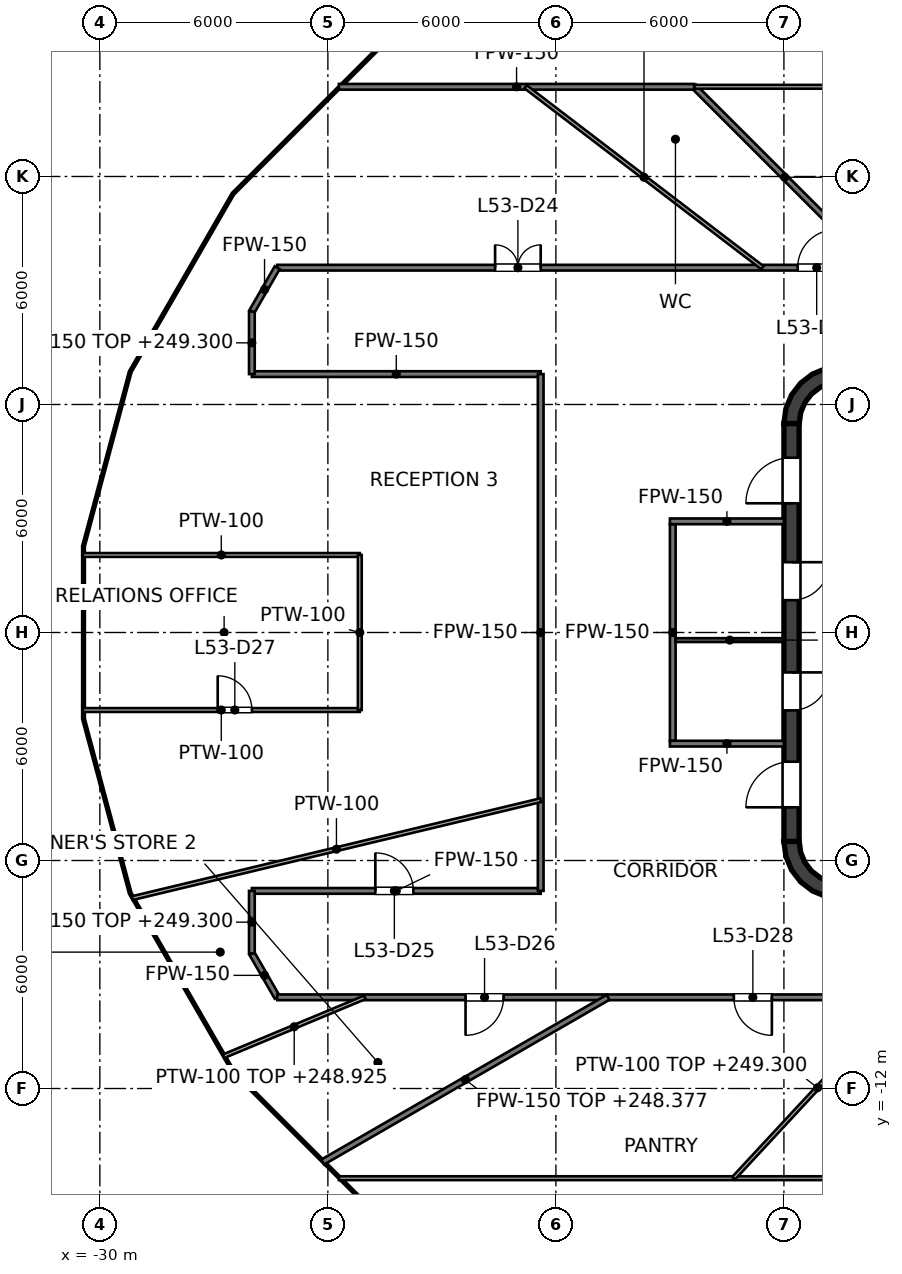
"""IFC4 building model, lengths in metres.
Left out: names, types, materials, properties, quantities, classifications, styles, units other than length and angle.
Written with IfcOpenShell. Run it as: python <this file> out.ifc"""

import sys

from ifc_helpers import new_model, si_unit, direction, frame, frame_2d, origin, place, context, subcontext, project, spatial, polyline, rectangle, outline, extrude, element, fill, save


model = new_model("IFC4")
c1 = context("Model", 3, precision=1e-05, world=origin(), true_north=direction((0.0, 1.0)))
c2 = subcontext(c1, "Body", "Model", "MODEL_VIEW")
j1 = project(units=[si_unit("LENGTHUNIT", "METRE"), si_unit("PLANEANGLEUNIT", "RADIAN")], contexts=[c1])
p1 = place(None, origin())
s1 = spatial("IfcSite", under=j1, at=p1, CompositionType="ELEMENT")
p2 = place(p1, origin())
s2 = spatial("IfcBuilding", under=s1, at=p2, CompositionType="ELEMENT")
p3 = place(p2, frame((0.0, 0.0, 245.6)))
s3 = spatial("IfcBuildingStorey", under=s2, at=p3, CompositionType="ELEMENT", Elevation=245.6)
p4 = place(p3, frame((-11.8, -5.5, 0.0), z_axis=(0.0, 0.0, 1.0), x_axis=(0.0, 1.0, 0.0)))
e1 = element("IfcWall", 1, at=p4, inside=s3, PredefinedType="SHEAR", context=c2, shape_type="SweptSolid", body=[
    extrude(rectangle(XDim=11.0, YDim=0.4, at=frame_2d((5.5, 0.0))), origin(), (0.0, 0.0, 1.0), 4.0),
])
p5 = place(p4, frame((3.45, 0.0, 0.0)))
e2 = element("IfcOpeningElement", 2, at=p5, cuts=e1, PredefinedType="OPENING", context=c2, shape_type="SweptSolid", body=[
    extrude(rectangle(XDim=1.0, YDim=2.1, at=frame_2d((0.5, 1.05))), frame((0.0, 0.2, 0.0), z_axis=(0.0, -1.0, 0.0), x_axis=(1.0, 0.0, 0.0)), (0.0, 0.0, 1.0), 0.4),
])
p6 = place(p4, frame((6.35, 0.0, 0.0)))
e3 = element("IfcOpeningElement", 3, at=p6, cuts=e1, PredefinedType="OPENING", context=c2, shape_type="SweptSolid", body=[
    extrude(rectangle(XDim=1.0, YDim=2.1, at=frame_2d((0.5, 1.05))), frame((0.0, 0.2, 0.0), z_axis=(0.0, -1.0, 0.0), x_axis=(1.0, 0.0, 0.0)), (0.0, 0.0, 1.0), 0.4),
])
p7 = place(p4, frame((0.9, 0.0, 0.0)))
e4 = element("IfcOpeningElement", 4, at=p7, cuts=e1, PredefinedType="OPENING", context=c2, shape_type="SweptSolid", body=[
    extrude(rectangle(XDim=1.2, YDim=2.1, at=frame_2d((0.6, 1.05))), frame((0.0, 0.2, 0.0), z_axis=(0.0, -1.0, 0.0), x_axis=(1.0, 0.0, 0.0)), (0.0, 0.0, 1.0), 0.4),
])
p8 = place(p4, frame((8.9, 0.0, 0.0)))
e5 = element("IfcOpeningElement", 5, at=p8, cuts=e1, PredefinedType="OPENING", context=c2, shape_type="SweptSolid", body=[
    extrude(rectangle(XDim=1.2, YDim=2.1, at=frame_2d((0.6, 1.05))), frame((0.0, 0.2, 0.0), z_axis=(0.0, -1.0, 0.0), x_axis=(1.0, 0.0, 0.0)), (0.0, 0.0, 1.0), 0.4),
])
p9 = place(p3, origin())
e6 = element("IfcWall", 6, at=p9, inside=s3, PredefinedType="SHEAR", context=c2, shape_type="SweptSolid", body=[
    extrude(outline(polyline([(-12.0, 5.5), (-11.596, 5.5), (-11.559, 5.784), (-11.45, 6.048), (-11.275, 6.275), (-11.048, 6.45), (-10.784, 6.559), (-10.5, 6.596), (-10.5, 7.0), (-10.888, 6.949), (-11.25, 6.799), (-11.561, 6.561), (-11.799, 6.25), (-11.949, 5.888), (-12.0, 5.5)])), origin(), (0.0, 0.0, 1.0), 4.0),
])
e7 = element("IfcWall", 7, at=p9, inside=s3, PredefinedType="SHEAR", context=c2, shape_type="SweptSolid", body=[
    extrude(outline(polyline([(-10.5, -7.0), (-10.5, -6.596), (-10.784, -6.559), (-11.048, -6.45), (-11.275, -6.275), (-11.45, -6.048), (-11.559, -5.784), (-11.596, -5.5), (-12.0, -5.5), (-11.949, -5.888), (-11.799, -6.25), (-11.561, -6.561), (-11.25, -6.799), (-10.888, -6.949), (-10.5, -7.0)])), origin(), (0.0, 0.0, 1.0), 4.0),
])
p10 = place(p3, frame((-14.925, -2.85, 0.0), z_axis=(0.0, 0.0, 1.0), x_axis=(0.0, 1.0, 0.0)))
e8 = element("IfcWall", 8, at=p10, inside=s3, PredefinedType="PARTITIONING", context=c2, shape_type="SweptSolid", body=[
    extrude(rectangle(XDim=5.7, YDim=0.15, at=frame_2d((2.85, 0.0))), origin(), (0.0, 0.0, 1.0), 2.768),
])
for number, where, z_axis, x_axis in (
    (9, (-15.0, 2.925, 0.0), (0.0, 0.0, 1.0), (1.0, 0.0, 0.0)),
    (10, (-15.0, -2.925, 0.0), (0.0, 0.0, 1.0), (1.0, 0.0, 0.0)),
):
    element("IfcWall", number, at=place(p3, frame(where, z_axis=z_axis, x_axis=x_axis)), inside=s3, PredefinedType="PARTITIONING", context=c2, shape_type="SweptSolid", body=[
        extrude(rectangle(XDim=3.0, YDim=0.15, at=frame_2d((1.5, 0.0))), origin(), (0.0, 0.0, 1.0), 2.768),
    ])
p11 = place(p3, frame((-14.85, -0.2, 0.0), z_axis=(0.0, 0.0, 1.0), x_axis=(1.0, 0.0, 0.0)))
e11 = element("IfcWall", 11, at=p11, inside=s3, PredefinedType="PARTITIONING", context=c2, shape_type="SweptSolid", body=[
    extrude(rectangle(XDim=2.85, YDim=0.1, at=frame_2d((1.425, 0.0))), origin(), (0.0, 0.0, 1.0), 2.768),
])
p12 = place(p3, frame((-26.0, -8.445, 0.0), z_axis=(0.0, 0.0, 1.0), x_axis=(0.500076310463, -0.865981341435, 0.0)))
e12 = element("IfcWall", 12, at=p12, inside=s3, PredefinedType="PARTITIONING", context=c2, shape_type="SweptSolid", body=[
    extrude(rectangle(XDim=1.334, YDim=0.15, at=frame_2d((0.667, 0.0))), origin(), (0.0, 0.0, 1.0), 2.768),
])
p13 = place(p3, frame((-14.36, 14.36, 0.0), z_axis=(0.0, 0.0, 1.0), x_axis=(0.707106781187, -0.707106781187, 0.0)))
e13 = element("IfcWall", 13, at=p13, inside=s3, PredefinedType="PARTITIONING", context=c2, shape_type="SweptSolid", body=[
    extrude(rectangle(XDim=6.732, YDim=0.15, at=frame_2d((3.366, 0.0))), origin(), (0.0, 0.0, 1.0), 2.768),
])
p14 = place(p3, frame((-25.333, -9.6, 0.0), z_axis=(0.0, 0.0, 1.0), x_axis=(1.0, 0.0, 0.0)))
e14 = element("IfcWall", 14, at=p14, inside=s3, PredefinedType="PARTITIONING", context=c2, shape_type="SweptSolid", body=[
    extrude(rectangle(XDim=50.666, YDim=0.15, at=frame_2d((25.333, 0.0))), origin(), (0.0, 0.0, 1.0), 2.768),
])
p15 = place(p14, frame((4.956, 0.0, 0.0)))
e15 = element("IfcOpeningElement", 15, at=p15, cuts=e14, PredefinedType="OPENING", context=c2, shape_type="SweptSolid", body=[
    extrude(rectangle(XDim=1.0, YDim=2.1, at=frame_2d((0.5, 1.05))), frame((0.0, 0.075, 0.0), z_axis=(0.0, -1.0, 0.0), x_axis=(1.0, 0.0, 0.0)), (0.0, 0.0, 1.0), 0.15),
])
p16 = place(p14, frame((12.016, 0.0, 0.0)))
e16 = element("IfcOpeningElement", 16, at=p16, cuts=e14, PredefinedType="OPENING", context=c2, shape_type="SweptSolid", body=[
    extrude(rectangle(XDim=1.0, YDim=2.1, at=frame_2d((0.5, 1.05))), frame((0.0, 0.075, 0.0), z_axis=(0.0, -1.0, 0.0), x_axis=(1.0, 0.0, 0.0)), (0.0, 0.0, 1.0), 0.15),
])
p17 = place(p14, frame((18.068, 0.0, 0.0)))
e17 = element("IfcOpeningElement", 17, at=p17, cuts=e14, PredefinedType="OPENING", context=c2, shape_type="SweptSolid", body=[
    extrude(rectangle(XDim=1.0, YDim=2.1, at=frame_2d((0.5, 1.05))), frame((0.0, 0.075, 0.0), z_axis=(0.0, -1.0, 0.0), x_axis=(1.0, 0.0, 0.0)), (0.0, 0.0, 1.0), 0.15),
])
p18 = place(p14, frame((22.521, 0.0, 0.0)))
e18 = element("IfcOpeningElement", 18, at=p18, cuts=e14, PredefinedType="OPENING", context=c2, shape_type="SweptSolid", body=[
    extrude(rectangle(XDim=1.0, YDim=2.1, at=frame_2d((0.5, 1.05))), frame((0.0, 0.075, 0.0), z_axis=(0.0, -1.0, 0.0), x_axis=(1.0, 0.0, 0.0)), (0.0, 0.0, 1.0), 0.15),
])
p19 = place(p14, frame((26.665, 0.0, 0.0)))
e19 = element("IfcOpeningElement", 19, at=p19, cuts=e14, PredefinedType="OPENING", context=c2, shape_type="SweptSolid", body=[
    extrude(rectangle(XDim=1.0, YDim=2.1, at=frame_2d((0.5, 1.05))), frame((0.0, 0.075, 0.0), z_axis=(0.0, -1.0, 0.0), x_axis=(1.0, 0.0, 0.0)), (0.0, 0.0, 1.0), 0.15),
])
p20 = place(p14, frame((31.12, 0.0, 0.0)))
e20 = element("IfcOpeningElement", 20, at=p20, cuts=e14, PredefinedType="OPENING", context=c2, shape_type="SweptSolid", body=[
    extrude(rectangle(XDim=1.0, YDim=2.1, at=frame_2d((0.5, 1.05))), frame((0.0, 0.075, 0.0), z_axis=(0.0, -1.0, 0.0), x_axis=(1.0, 0.0, 0.0)), (0.0, 0.0, 1.0), 0.15),
])
p21 = place(p14, frame((41.953, 0.0, 0.0)))
e21 = element("IfcOpeningElement", 21, at=p21, cuts=e14, PredefinedType="OPENING", context=c2, shape_type="SweptSolid", body=[
    extrude(rectangle(XDim=1.0, YDim=2.1, at=frame_2d((0.5, 1.05))), frame((0.0, 0.075, 0.0), z_axis=(0.0, -1.0, 0.0), x_axis=(1.0, 0.0, 0.0)), (0.0, 0.0, 1.0), 0.15),
])
p22 = place(p3, frame((-26.0, -6.8, 0.0), z_axis=(0.0, 0.0, 1.0), x_axis=(1.0, 0.0, 0.0)))
e22 = element("IfcWall", 22, at=p22, inside=s3, PredefinedType="PARTITIONING", context=c2, shape_type="SweptSolid", body=[
    extrude(rectangle(XDim=7.6, YDim=0.15, at=frame_2d((3.8, 0.0))), origin(), (0.0, 0.0, 1.0), 2.768),
])
p23 = place(p22, frame((3.249, 0.0, 0.0)))
e23 = element("IfcOpeningElement", 23, at=p23, cuts=e22, PredefinedType="OPENING", context=c2, shape_type="SweptSolid", body=[
    extrude(rectangle(XDim=1.0, YDim=2.1, at=frame_2d((0.5, 1.05))), frame((0.0, 0.075, 0.0), z_axis=(0.0, -1.0, 0.0), x_axis=(1.0, 0.0, 0.0)), (0.0, 0.0, 1.0), 0.15),
])
p24 = place(p3, frame((-26.0, 6.8, 0.0), z_axis=(0.0, 0.0, 1.0), x_axis=(1.0, 0.0, 0.0)))
e24 = element("IfcWall", 24, at=p24, inside=s3, PredefinedType="PARTITIONING", context=c2, shape_type="SweptSolid", body=[
    extrude(rectangle(XDim=7.6, YDim=0.15, at=frame_2d((3.8, 0.0))), origin(), (0.0, 0.0, 1.0), 2.768),
])
p25 = place(p3, frame((-25.333, 9.6, 0.0), z_axis=(0.0, 0.0, 1.0), x_axis=(1.0, 0.0, 0.0)))
e25 = element("IfcWall", 25, at=p25, inside=s3, PredefinedType="PARTITIONING", context=c2, shape_type="SweptSolid", body=[
    extrude(rectangle(XDim=50.666, YDim=0.15, at=frame_2d((25.333, 0.0))), origin(), (0.0, 0.0, 1.0), 2.768),
])
p26 = place(p25, frame((40.221, 0.0, 0.0)))
e26 = element("IfcOpeningElement", 26, at=p26, cuts=e25, PredefinedType="OPENING", context=c2, shape_type="SweptSolid", body=[
    extrude(rectangle(XDim=1.2, YDim=2.1, at=frame_2d((0.6, 1.05))), frame((0.0, 0.075, 0.0), z_axis=(0.0, -1.0, 0.0), x_axis=(1.0, 0.0, 0.0)), (0.0, 0.0, 1.0), 0.15),
])
p27 = place(p25, frame((28.328, 0.0, 0.0)))
e27 = element("IfcOpeningElement", 27, at=p27, cuts=e25, PredefinedType="OPENING", context=c2, shape_type="SweptSolid", body=[
    extrude(rectangle(XDim=1.0, YDim=2.1, at=frame_2d((0.5, 1.05))), frame((0.0, 0.075, 0.0), z_axis=(0.0, -1.0, 0.0), x_axis=(1.0, 0.0, 0.0)), (0.0, 0.0, 1.0), 0.15),
])
p28 = place(p25, frame((24.461, 0.0, 0.0)))
e28 = element("IfcOpeningElement", 28, at=p28, cuts=e25, PredefinedType="OPENING", context=c2, shape_type="SweptSolid", body=[
    extrude(rectangle(XDim=1.0, YDim=2.1, at=frame_2d((0.5, 1.05))), frame((0.0, 0.075, 0.0), z_axis=(0.0, -1.0, 0.0), x_axis=(1.0, 0.0, 0.0)), (0.0, 0.0, 1.0), 0.15),
])
p29 = place(p25, frame((18.938, 0.0, 0.0)))
e29 = element("IfcOpeningElement", 29, at=p29, cuts=e25, PredefinedType="OPENING", context=c2, shape_type="SweptSolid", body=[
    extrude(rectangle(XDim=1.0, YDim=2.1, at=frame_2d((0.5, 1.05))), frame((0.0, 0.075, 0.0), z_axis=(0.0, -1.0, 0.0), x_axis=(1.0, 0.0, 0.0)), (0.0, 0.0, 1.0), 0.15),
])
p30 = place(p25, frame((13.695, 0.0, 0.0)))
e30 = element("IfcOpeningElement", 30, at=p30, cuts=e25, PredefinedType="OPENING", context=c2, shape_type="SweptSolid", body=[
    extrude(rectangle(XDim=1.0, YDim=2.1, at=frame_2d((0.5, 1.05))), frame((0.0, 0.075, 0.0), z_axis=(0.0, -1.0, 0.0), x_axis=(1.0, 0.0, 0.0)), (0.0, 0.0, 1.0), 0.15),
])
p31 = place(p25, frame((5.733, 0.0, 0.0)))
e31 = element("IfcOpeningElement", 31, at=p31, cuts=e25, PredefinedType="OPENING", context=c2, shape_type="SweptSolid", body=[
    extrude(rectangle(XDim=1.2, YDim=2.1, at=frame_2d((0.6, 1.05))), frame((0.0, 0.075, 0.0), z_axis=(0.0, -1.0, 0.0), x_axis=(1.0, 0.0, 0.0)), (0.0, 0.0, 1.0), 0.15),
])
p32 = place(p3, frame((-23.71, 14.36, 0.0), z_axis=(0.0, 0.0, 1.0), x_axis=(1.0, 0.0, 0.0)))
e32 = element("IfcWall", 32, at=p32, inside=s3, PredefinedType="PARTITIONING", context=c2, shape_type="SweptSolid", body=[
    extrude(rectangle(XDim=9.35, YDim=0.15, at=frame_2d((4.675, 0.0))), origin(), (0.0, 0.0, 1.0), 2.768),
])
p33 = place(p3, frame((-24.135, -13.935, 0.0), z_axis=(0.0, 0.0, 1.0), x_axis=(0.866016292776, 0.500015780397, 0.0)))
e33 = element("IfcWall", 33, at=p33, inside=s3, PredefinedType="PARTITIONING", context=c2, shape_type="SweptSolid", body=[
    extrude(rectangle(XDim=8.67, YDim=0.15, at=frame_2d((4.335, 0.0))), origin(), (0.0, 0.0, 1.0), 2.777),
])
p34 = place(p3, frame((-26.0, 8.445, 0.0), z_axis=(0.0, 0.0, 1.0), x_axis=(0.500076310463, 0.865981341435, 0.0)))
e34 = element("IfcWall", 34, at=p34, inside=s3, PredefinedType="PARTITIONING", context=c2, shape_type="SweptSolid", body=[
    extrude(rectangle(XDim=1.334, YDim=0.15, at=frame_2d((0.667, 0.0))), origin(), (0.0, 0.0, 1.0), 2.768),
])
p35 = place(p3, frame((-18.4, -6.8, 0.0), z_axis=(0.0, 0.0, 1.0), x_axis=(0.0, 1.0, 0.0)))
e35 = element("IfcWall", 35, at=p35, inside=s3, PredefinedType="PARTITIONING", context=c2, shape_type="SweptSolid", body=[
    extrude(rectangle(XDim=13.6, YDim=0.15, at=frame_2d((6.8, 0.0))), origin(), (0.0, 0.0, 1.0), 2.768),
])
for number, where, z_axis, x_axis in (
    (36, (-26.0, -8.445, 0.0), (0.0, 0.0, 1.0), (0.0, 1.0, 0.0)),
    (37, (-26.0, 6.8, 0.0), (0.0, 0.0, 1.0), (0.0, 1.0, 0.0)),
):
    element("IfcWall", number, at=place(p3, frame(where, z_axis=z_axis, x_axis=x_axis)), inside=s3, PredefinedType="PARTITIONING", context=c2, shape_type="SweptSolid", body=[
        extrude(rectangle(XDim=1.645, YDim=0.15, at=frame_2d((0.823, 0.0))), origin(), (0.0, 0.0, 1.0), 3.7),
    ])
p36 = place(p3, frame((-18.797, 14.36, 0.0), z_axis=(0.0, 0.0, 1.0), x_axis=(0.794667043869, -0.607045541445, 0.0)))
e38 = element("IfcWall", 38, at=p36, inside=s3, PredefinedType="PARTITIONING", context=c2, shape_type="SweptSolid", body=[
    extrude(rectangle(XDim=7.841, YDim=0.1, at=frame_2d((3.921, 0.0))), origin(), (0.0, 0.0, 1.0), 3.7),
])
p37 = place(p3, frame((-23.71, -14.36, 0.0), z_axis=(0.0, 0.0, 1.0), x_axis=(1.0, 0.0, 0.0)))
e39 = element("IfcWall", 39, at=p37, inside=s3, PredefinedType="PARTITIONING", context=c2, shape_type="SweptSolid", body=[
    extrude(rectangle(XDim=47.42, YDim=0.1, at=frame_2d((23.71, 0.0))), origin(), (0.0, 0.0, 1.0), 2.768),
])
p38 = place(p37, frame((19.302, 0.0, 0.0)))
e40 = element("IfcOpeningElement", 40, at=p38, cuts=e39, PredefinedType="OPENING", context=c2, shape_type="SweptSolid", body=[
    extrude(rectangle(XDim=1.8, YDim=2.1, at=frame_2d((0.9, 1.05))), frame((0.0, 0.05, 0.0), z_axis=(0.0, -1.0, 0.0), x_axis=(1.0, 0.0, 0.0)), (0.0, 0.0, 1.0), 0.1),
])
p39 = place(p37, frame((41.074, 0.0, 0.0)))
e41 = element("IfcOpeningElement", 41, at=p39, cuts=e39, PredefinedType="OPENING", context=c2, shape_type="SweptSolid", body=[
    extrude(rectangle(XDim=1.8, YDim=2.1, at=frame_2d((0.9, 1.05))), frame((0.0, 0.05, 0.0), z_axis=(0.0, -1.0, 0.0), x_axis=(1.0, 0.0, 0.0)), (0.0, 0.0, 1.0), 0.1),
])
p40 = place(p3, frame((-30.45, -2.04, 0.0), z_axis=(0.0, 0.0, 1.0), x_axis=(1.0, 0.0, 0.0)))
e42 = element("IfcWall", 42, at=p40, inside=s3, PredefinedType="PARTITIONING", context=c2, shape_type="SweptSolid", body=[
    extrude(rectangle(XDim=7.29, YDim=0.1, at=frame_2d((3.645, 0.0))), origin(), (0.0, 0.0, 1.0), 2.768),
])
p41 = place(p40, frame((3.551, 0.0, 0.0)))
e43 = element("IfcOpeningElement", 43, at=p41, cuts=e42, PredefinedType="OPENING", context=c2, shape_type="SweptSolid", body=[
    extrude(rectangle(XDim=0.9, YDim=2.1, at=frame_2d((0.45, 1.05))), frame((0.0, 0.05, 0.0), z_axis=(0.0, -1.0, 0.0), x_axis=(1.0, 0.0, 0.0)), (0.0, 0.0, 1.0), 0.1),
])
p42 = place(p3, frame((-30.45, 2.04, 0.0), z_axis=(0.0, 0.0, 1.0), x_axis=(1.0, 0.0, 0.0)))
e44 = element("IfcWall", 44, at=p42, inside=s3, PredefinedType="PARTITIONING", context=c2, shape_type="SweptSolid", body=[
    extrude(rectangle(XDim=7.29, YDim=0.1, at=frame_2d((3.645, 0.0))), origin(), (0.0, 0.0, 1.0), 2.768),
])
p43 = place(p3, frame((-14.36, 14.36, 0.0), z_axis=(0.0, 0.0, 1.0), x_axis=(1.0, 0.0, 0.0)))
e45 = element("IfcWall", 45, at=p43, inside=s3, PredefinedType="PARTITIONING", context=c2, shape_type="SweptSolid", body=[
    extrude(rectangle(XDim=22.651, YDim=0.1, at=frame_2d((11.326, 0.0))), origin(), (0.0, 0.0, 1.0), 2.768),
])
p44 = place(p43, frame((4.642, 0.0, 0.0)))
e46 = element("IfcOpeningElement", 46, at=p44, cuts=e45, PredefinedType="OPENING", context=c2, shape_type="SweptSolid", body=[
    extrude(rectangle(XDim=1.8, YDim=2.1, at=frame_2d((0.9, 1.05))), frame((0.0, 0.05, 0.0), z_axis=(0.0, -1.0, 0.0), x_axis=(1.0, 0.0, 0.0)), (0.0, 0.0, 1.0), 0.1),
])
p45 = place(p3, frame((-29.149, -6.991, 0.0), z_axis=(0.0, 0.0, 1.0), x_axis=(0.97242598182, 0.233211727583, 0.0)))
e47 = element("IfcWall", 47, at=p45, inside=s3, PredefinedType="PARTITIONING", context=c2, shape_type="SweptSolid", body=[
    extrude(rectangle(XDim=11.054, YDim=0.1, at=frame_2d((5.527, 0.0))), origin(), (0.0, 0.0, 1.0), 2.768),
])
p46 = place(p3, frame((-26.747, -11.152, 0.0), z_axis=(0.0, 0.0, 1.0), x_axis=(0.922980174508, 0.384847498973, 0.0)))
e48 = element("IfcWall", 48, at=p46, inside=s3, PredefinedType="PARTITIONING", context=c2, shape_type="SweptSolid", body=[
    extrude(rectangle(XDim=4.033, YDim=0.1, at=frame_2d((2.016, 0.0))), origin(), (0.0, 0.0, 1.0), 3.325),
])
p47 = place(p3, frame((-13.324, -14.36, 0.0), z_axis=(0.0, 0.0, 1.0), x_axis=(0.680201581888, 0.733025107344, 0.0)))
e49 = element("IfcWall", 49, at=p47, inside=s3, PredefinedType="PARTITIONING", context=c2, shape_type="SweptSolid", body=[
    extrude(rectangle(XDim=6.494, YDim=0.1, at=frame_2d((3.247, 0.0))), origin(), (0.0, 0.0, 1.0), 3.7),
])
p48 = place(p3, frame((-23.16, -2.04, 0.0), z_axis=(0.0, 0.0, 1.0), x_axis=(0.0, 1.0, 0.0)))
e50 = element("IfcWall", 50, at=p48, inside=s3, PredefinedType="PARTITIONING", context=c2, shape_type="SweptSolid", body=[
    extrude(rectangle(XDim=4.08, YDim=0.1, at=frame_2d((2.04, 0.0))), origin(), (0.0, 0.0, 1.0), 2.768),
])
p49 = place(p5, origin())
e51 = element("IfcDoor", 51, at=p49, inside=s3, OperationType="SINGLE_SWING_RIGHT", PredefinedType="DOOR", context=c2, shape_type="SweptSolid", body=[
    extrude(rectangle(XDim=1.0, YDim=2.1, at=frame_2d((0.5, 1.05))), frame((0.0, 0.025, 0.0), z_axis=(0.0, -1.0, 0.0), x_axis=(1.0, 0.0, 0.0)), (0.0, 0.0, 1.0), 0.05),
])
fill(e2, e51)
p50 = place(p6, origin())
e52 = element("IfcDoor", 52, at=p50, inside=s3, OperationType="SINGLE_SWING_RIGHT", PredefinedType="DOOR", context=c2, shape_type="SweptSolid", body=[
    extrude(rectangle(XDim=1.0, YDim=2.1, at=frame_2d((0.5, 1.05))), frame((0.0, 0.025, 0.0), z_axis=(0.0, -1.0, 0.0), x_axis=(1.0, 0.0, 0.0)), (0.0, 0.0, 1.0), 0.05),
])
fill(e3, e52)
p51 = place(p7, origin())
e53 = element("IfcDoor", 53, at=p51, inside=s3, OperationType="SINGLE_SWING_LEFT", PredefinedType="DOOR", context=c2, shape_type="SweptSolid", body=[
    extrude(rectangle(XDim=1.2, YDim=2.1, at=frame_2d((0.6, 1.05))), frame((0.0, 0.025, 0.0), z_axis=(0.0, -1.0, 0.0), x_axis=(1.0, 0.0, 0.0)), (0.0, 0.0, 1.0), 0.05),
])
fill(e4, e53)
p52 = place(p8, origin())
e54 = element("IfcDoor", 54, at=p52, inside=s3, OperationType="SINGLE_SWING_LEFT", PredefinedType="DOOR", context=c2, shape_type="SweptSolid", body=[
    extrude(rectangle(XDim=1.2, YDim=2.1, at=frame_2d((0.6, 1.05))), frame((0.0, 0.025, 0.0), z_axis=(0.0, -1.0, 0.0), x_axis=(1.0, 0.0, 0.0)), (0.0, 0.0, 1.0), 0.05),
])
fill(e5, e54)
p53 = place(p30, origin())
e55 = element("IfcDoor", 55, at=p53, inside=s3, OperationType="SINGLE_SWING_RIGHT", PredefinedType="DOOR", context=c2, shape_type="SweptSolid", body=[
    extrude(rectangle(XDim=1.0, YDim=2.1, at=frame_2d((0.5, 1.05))), frame((0.0, 0.025, 0.0), z_axis=(0.0, -1.0, 0.0), x_axis=(1.0, 0.0, 0.0)), (0.0, 0.0, 1.0), 0.05),
])
fill(e30, e55)
p54 = place(p31, origin())
e56 = element("IfcDoor", 56, at=p54, inside=s3, OperationType="DOUBLE_DOOR_SINGLE_SWING", PredefinedType="DOOR", context=c2, shape_type="SweptSolid", body=[
    extrude(rectangle(XDim=1.2, YDim=2.1, at=frame_2d((0.6, 1.05))), frame((0.0, 0.025, 0.0), z_axis=(0.0, -1.0, 0.0), x_axis=(1.0, 0.0, 0.0)), (0.0, 0.0, 1.0), 0.05),
])
fill(e31, e56)
p55 = place(p23, origin())
e57 = element("IfcDoor", 57, at=p55, inside=s3, OperationType="SINGLE_SWING_LEFT", PredefinedType="DOOR", context=c2, shape_type="SweptSolid", body=[
    extrude(rectangle(XDim=1.0, YDim=2.1, at=frame_2d((0.5, 1.05))), frame((0.0, 0.025, 0.0), z_axis=(0.0, -1.0, 0.0), x_axis=(1.0, 0.0, 0.0)), (0.0, 0.0, 1.0), 0.05),
])
fill(e23, e57)
p56 = place(p15, origin())
e58 = element("IfcDoor", 58, at=p56, inside=s3, OperationType="SINGLE_SWING_LEFT", PredefinedType="DOOR", context=c2, shape_type="SweptSolid", body=[
    extrude(rectangle(XDim=1.0, YDim=2.1, at=frame_2d((0.5, 1.05))), frame((0.0, 0.025, 0.0), z_axis=(0.0, -1.0, 0.0), x_axis=(1.0, 0.0, 0.0)), (0.0, 0.0, 1.0), 0.05),
])
fill(e15, e58)
p57 = place(p41, origin())
e59 = element("IfcDoor", 59, at=p57, inside=s3, OperationType="SINGLE_SWING_LEFT", PredefinedType="DOOR", context=c2, shape_type="SweptSolid", body=[
    extrude(rectangle(XDim=0.9, YDim=2.1, at=frame_2d((0.45, 1.05))), frame((0.0, 0.025, 0.0), z_axis=(0.0, -1.0, 0.0), x_axis=(1.0, 0.0, 0.0)), (0.0, 0.0, 1.0), 0.05),
])
fill(e43, e59)
p58 = place(p16, origin())
e60 = element("IfcDoor", 60, at=p58, inside=s3, OperationType="SINGLE_SWING_RIGHT", PredefinedType="DOOR", context=c2, shape_type="SweptSolid", body=[
    extrude(rectangle(XDim=1.0, YDim=2.1, at=frame_2d((0.5, 1.05))), frame((0.0, 0.025, 0.0), z_axis=(0.0, -1.0, 0.0), x_axis=(1.0, 0.0, 0.0)), (0.0, 0.0, 1.0), 0.05),
])
fill(e16, e60)
save(model, sys.argv[1])
